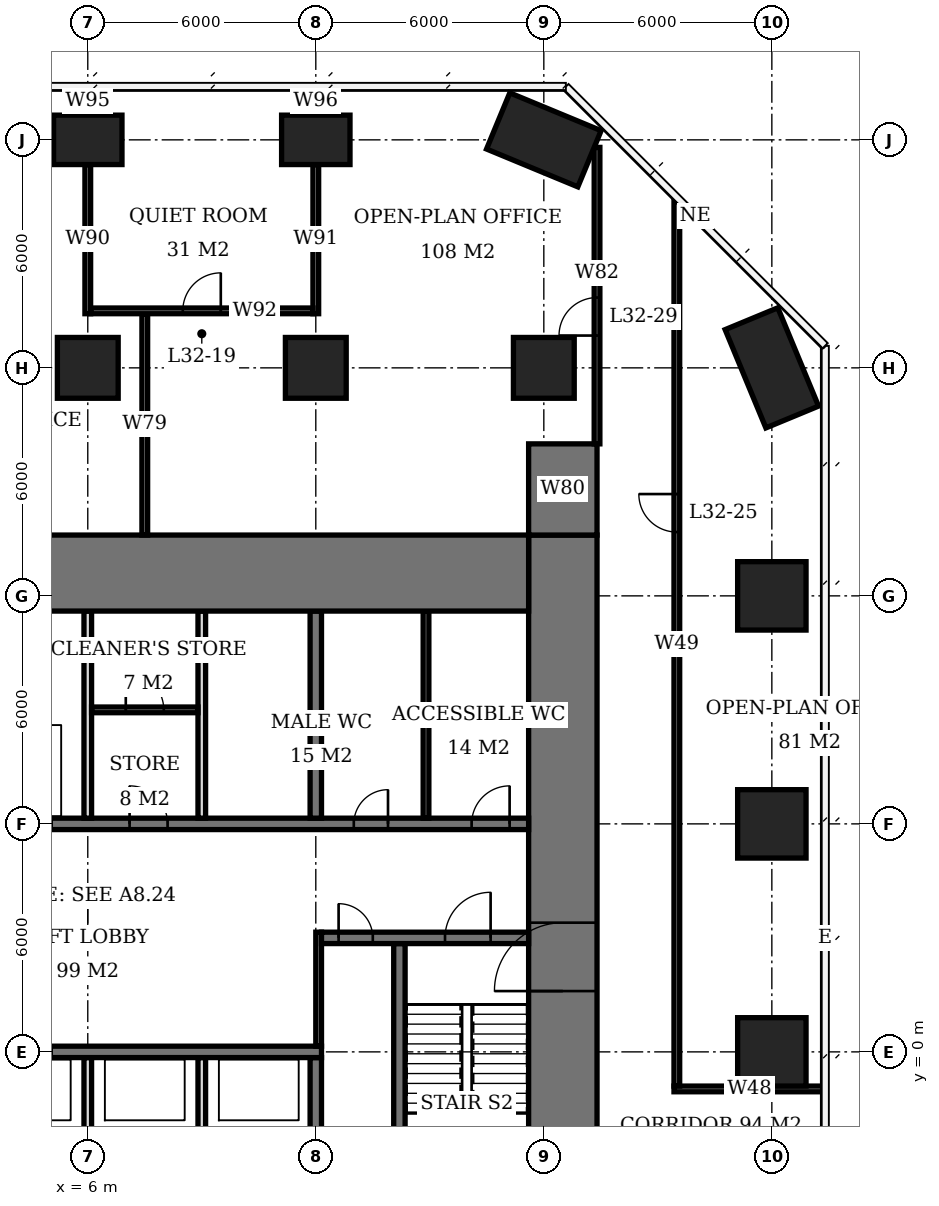
"""IFC4 building model, lengths in metres.
Left out: names, types, materials, properties, quantities, classifications, styles, units other than length and angle.
Written with IfcOpenShell. Run it as: python <this file> out.ifc"""

import sys

from ifc_helpers import new_model, si_unit, direction, frame, frame_2d, origin, origin_2d, place, context, subcontext, project, spatial, rectangle, extrude, element, fill, save


model = new_model("IFC4")
c1 = context("Model", 3, precision=1e-05, world=origin(), true_north=direction((0.0, 1.0)))
c2 = subcontext(c1, "Body", "Model", "MODEL_VIEW")
j1 = project(units=[si_unit("LENGTHUNIT", "METRE"), si_unit("PLANEANGLEUNIT", "RADIAN")], contexts=[c1])
p1 = place(None, origin())
s1 = spatial("IfcSite", under=j1, at=p1, CompositionType="ELEMENT")
p2 = place(p1, origin())
s2 = spatial("IfcBuilding", under=s1, at=p2, CompositionType="ELEMENT")
p3 = place(p2, frame((0.0, 0.0, 132.8)))
s3 = spatial("IfcBuildingStorey", under=s2, at=p3, CompositionType="ELEMENT", Elevation=132.8)
p4 = place(p3, frame((6.0, 18.0, 0.0), z_axis=(0.0, 0.0, 1.0), x_axis=(1.0, 0.0, 0.0)))
e1 = element("IfcColumn", 1, at=p4, inside=s3, PredefinedType="COLUMN", context=c2, shape_type="SweptSolid", body=[
    extrude(rectangle(XDim=1.6, YDim=1.6, at=origin_2d()), origin(), (0.0, 0.0, 1.0), 3.9),
])
p5 = place(p3, frame((6.0, 24.0, 0.0), z_axis=(0.0, 0.0, 1.0), x_axis=(1.0, 0.0, 0.0)))
e2 = element("IfcColumn", 2, at=p5, inside=s3, PredefinedType="COLUMN", context=c2, shape_type="SweptSolid", body=[
    extrude(rectangle(XDim=1.8, YDim=1.3, at=origin_2d()), origin(), (0.0, 0.0, 1.0), 3.9),
])
p6 = place(p3, frame((12.0, 18.0, 0.0), z_axis=(0.0, 0.0, 1.0), x_axis=(1.0, 0.0, 0.0)))
e3 = element("IfcColumn", 3, at=p6, inside=s3, PredefinedType="COLUMN", context=c2, shape_type="SweptSolid", body=[
    extrude(rectangle(XDim=1.6, YDim=1.6, at=origin_2d()), origin(), (0.0, 0.0, 1.0), 3.9),
])
p7 = place(p3, frame((12.0, 24.0, 0.0), z_axis=(0.0, 0.0, 1.0), x_axis=(1.0, 0.0, 0.0)))
e4 = element("IfcColumn", 4, at=p7, inside=s3, PredefinedType="COLUMN", context=c2, shape_type="SweptSolid", body=[
    extrude(rectangle(XDim=1.8, YDim=1.3, at=origin_2d()), origin(), (0.0, 0.0, 1.0), 3.9),
])
p8 = place(p3, frame((18.0, 18.0, 0.0), z_axis=(0.0, 0.0, 1.0), x_axis=(1.0, 0.0, 0.0)))
e5 = element("IfcColumn", 5, at=p8, inside=s3, PredefinedType="COLUMN", context=c2, shape_type="SweptSolid", body=[
    extrude(rectangle(XDim=1.6, YDim=1.6, at=origin_2d()), origin(), (0.0, 0.0, 1.0), 3.9),
])
p9 = place(p3, frame((18.0, 24.0, 0.0), z_axis=(0.0, 0.0, 1.0), x_axis=(0.923879532511, -0.382683432365, 0.0)))
e6 = element("IfcColumn", 6, at=p9, inside=s3, PredefinedType="COLUMN", context=c2, shape_type="SweptSolid", body=[
    extrude(rectangle(XDim=2.6, YDim=1.6, at=origin_2d()), origin(), (0.0, 0.0, 1.0), 3.9),
])
for number, where, z_axis, x_axis in (
    (7, (24.0, 0.0, 0.0), (0.0, 0.0, 1.0), (1.0, 0.0, 0.0)),
    (8, (24.0, 6.0, 0.0), (0.0, 0.0, 1.0), (1.0, 0.0, 0.0)),
    (9, (24.0, 12.0, 0.0), (0.0, 0.0, 1.0), (1.0, 0.0, 0.0)),
):
    element("IfcColumn", number, at=place(p3, frame(where, z_axis=z_axis, x_axis=x_axis)), inside=s3, PredefinedType="COLUMN", context=c2, shape_type="SweptSolid", body=[
        extrude(rectangle(XDim=1.8, YDim=1.8, at=origin_2d()), origin(), (0.0, 0.0, 1.0), 3.9),
    ])
p10 = place(p3, frame((24.0, 18.0, 0.0), z_axis=(0.0, 0.0, 1.0), x_axis=(0.382683432365, -0.923879532511, 0.0)))
e10 = element("IfcColumn", 10, at=p10, inside=s3, PredefinedType="COLUMN", context=c2, shape_type="SweptSolid", body=[
    extrude(rectangle(XDim=2.8, YDim=1.5, at=origin_2d()), origin(), (0.0, 0.0, 1.0), 3.9),
])
p11 = place(p3, frame((-5.6, 12.6, 0.0), z_axis=(0.0, 0.0, 1.0), x_axis=(1.0, 0.0, 0.0)))
e11 = element("IfcWall", 11, at=p11, inside=s3, PredefinedType="SHEAR", context=c2, shape_type="SweptSolid", body=[
    extrude(rectangle(XDim=23.2, YDim=2.0, at=frame_2d((11.6, 0.0))), origin(), (0.0, 0.0, 1.0), 3.9),
])
p12 = place(p3, frame((18.5, -7.6, 0.0), z_axis=(0.0, 0.0, 1.0), x_axis=(0.0, 1.0, 0.0)))
e12 = element("IfcWall", 12, at=p12, inside=s3, PredefinedType="SHEAR", context=c2, shape_type="SweptSolid", body=[
    extrude(rectangle(XDim=21.2, YDim=1.8, at=frame_2d((10.6, 0.0))), origin(), (0.0, 0.0, 1.0), 3.9),
])
p13 = place(p12, frame((9.2, 0.0, 0.0)))
e13 = element("IfcOpeningElement", 13, at=p13, cuts=e12, PredefinedType="OPENING", context=c2, shape_type="SweptSolid", body=[
    extrude(rectangle(XDim=1.8, YDim=2.4, at=frame_2d((0.9, 1.2))), frame((0.0, 0.91, 0.0), z_axis=(0.0, -1.0, 0.0), x_axis=(1.0, 0.0, 0.0)), (0.0, 0.0, 1.0), 1.82),
])
p14 = place(p3, frame((18.5, 13.6, 0.0), z_axis=(0.0, 0.0, 1.0), x_axis=(0.0, 1.0, 0.0)))
e14 = element("IfcWall", 14, at=p14, inside=s3, PredefinedType="SHEAR", context=c2, shape_type="SweptSolid", body=[
    extrude(rectangle(XDim=2.4, YDim=1.8, at=frame_2d((1.2, 0.0))), origin(), (0.0, 0.0, 1.0), 3.9),
])
p15 = place(p3, frame((-5.6, 0.0, 0.0), z_axis=(0.0, 0.0, 1.0), x_axis=(1.0, 0.0, 0.0)))
e15 = element("IfcWall", 15, at=p15, inside=s3, PredefinedType="SHEAR", context=c2, shape_type="SweptSolid", body=[
    extrude(rectangle(XDim=17.75, YDim=0.3, at=frame_2d((8.875, 0.0))), origin(), (0.0, 0.0, 1.0), 3.9),
])
p16 = place(p15, frame((0.6, 0.0, 0.0)))
e16 = element("IfcOpeningElement", 16, at=p16, cuts=e15, PredefinedType="OPENING", context=c2, shape_type="SweptSolid", body=[
    extrude(rectangle(XDim=0.9, YDim=2.1, at=frame_2d((0.45, 1.05))), frame((0.0, 0.16, 0.0), z_axis=(0.0, -1.0, 0.0), x_axis=(1.0, 0.0, 0.0)), (0.0, 0.0, 1.0), 0.32),
])
p17 = place(p15, frame((3.7, 0.0, 0.0)))
e17 = element("IfcOpeningElement", 17, at=p17, cuts=e15, PredefinedType="OPENING", context=c2, shape_type="SweptSolid", body=[
    extrude(rectangle(XDim=1.0, YDim=2.1, at=frame_2d((0.5, 1.05))), frame((0.0, 0.16, 0.0), z_axis=(0.0, -1.0, 0.0), x_axis=(1.0, 0.0, 0.0)), (0.0, 0.0, 1.0), 0.32),
])
p18 = place(p15, frame((6.55, 0.0, 0.0)))
e18 = element("IfcOpeningElement", 18, at=p18, cuts=e15, PredefinedType="OPENING", context=c2, shape_type="SweptSolid", body=[
    extrude(rectangle(XDim=1.1, YDim=2.1, at=frame_2d((0.55, 1.05))), frame((0.0, 0.16, 0.0), z_axis=(0.0, -1.0, 0.0), x_axis=(1.0, 0.0, 0.0)), (0.0, 0.0, 1.0), 0.32),
])
p19 = place(p15, frame((9.55, 0.0, 0.0)))
e19 = element("IfcOpeningElement", 19, at=p19, cuts=e15, PredefinedType="OPENING", context=c2, shape_type="SweptSolid", body=[
    extrude(rectangle(XDim=1.1, YDim=2.1, at=frame_2d((0.55, 1.05))), frame((0.0, 0.16, 0.0), z_axis=(0.0, -1.0, 0.0), x_axis=(1.0, 0.0, 0.0)), (0.0, 0.0, 1.0), 0.32),
])
p20 = place(p3, frame((12.15, 3.0, 0.0), z_axis=(0.0, 0.0, 1.0), x_axis=(1.0, 0.0, 0.0)))
e20 = element("IfcWall", 20, at=p20, inside=s3, PredefinedType="SHEAR", context=c2, shape_type="SweptSolid", body=[
    extrude(rectangle(XDim=5.45, YDim=0.3, at=frame_2d((2.725, 0.0))), origin(), (0.0, 0.0, 1.0), 3.9),
])
p21 = place(p20, frame((3.25, 0.0, 0.0)))
e21 = element("IfcOpeningElement", 21, at=p21, cuts=e20, PredefinedType="OPENING", context=c2, shape_type="SweptSolid", body=[
    extrude(rectangle(XDim=1.2, YDim=2.1, at=frame_2d((0.6, 1.05))), frame((0.0, 0.16, 0.0), z_axis=(0.0, -1.0, 0.0), x_axis=(1.0, 0.0, 0.0)), (0.0, 0.0, 1.0), 0.32),
])
p22 = place(p20, frame((0.45, 0.0, 0.0)))
e22 = element("IfcOpeningElement", 22, at=p22, cuts=e20, PredefinedType="OPENING", context=c2, shape_type="SweptSolid", body=[
    extrude(rectangle(XDim=0.9, YDim=2.1, at=frame_2d((0.45, 1.05))), frame((0.0, 0.16, 0.0), z_axis=(0.0, -1.0, 0.0), x_axis=(1.0, 0.0, 0.0)), (0.0, 0.0, 1.0), 0.32),
])
p23 = place(p3, frame((-0.15, 6.0, 0.0), z_axis=(0.0, 0.0, 1.0), x_axis=(1.0, 0.0, 0.0)))
e23 = element("IfcWall", 23, at=p23, inside=s3, PredefinedType="SHEAR", context=c2, shape_type="SweptSolid", body=[
    extrude(rectangle(XDim=17.75, YDim=0.3, at=frame_2d((8.875, 0.0))), origin(), (0.0, 0.0, 1.0), 3.9),
])
p24 = place(p23, frame((13.15, 0.0, 0.0)))
e24 = element("IfcOpeningElement", 24, at=p24, cuts=e23, PredefinedType="OPENING", context=c2, shape_type="SweptSolid", body=[
    extrude(rectangle(XDim=0.9, YDim=2.1, at=frame_2d((0.45, 1.05))), frame((0.0, 0.16, 0.0), z_axis=(0.0, -1.0, 0.0), x_axis=(1.0, 0.0, 0.0)), (0.0, 0.0, 1.0), 0.32),
])
p25 = place(p23, frame((16.25, 0.0, 0.0)))
e25 = element("IfcOpeningElement", 25, at=p25, cuts=e23, PredefinedType="OPENING", context=c2, shape_type="SweptSolid", body=[
    extrude(rectangle(XDim=1.0, YDim=2.1, at=frame_2d((0.5, 1.05))), frame((0.0, 0.16, 0.0), z_axis=(0.0, -1.0, 0.0), x_axis=(1.0, 0.0, 0.0)), (0.0, 0.0, 1.0), 0.32),
])
p26 = place(p23, frame((7.25, 0.0, 0.0)))
e26 = element("IfcOpeningElement", 26, at=p26, cuts=e23, PredefinedType="OPENING", context=c2, shape_type="SweptSolid", body=[
    extrude(rectangle(XDim=1.0, YDim=2.1, at=frame_2d((0.5, 1.05))), frame((0.0, 0.16, 0.0), z_axis=(0.0, -1.0, 0.0), x_axis=(1.0, 0.0, 0.0)), (0.0, 0.0, 1.0), 0.32),
])
p27 = place(p23, frame((1.1, 0.0, 0.0)))
e27 = element("IfcOpeningElement", 27, at=p27, cuts=e23, PredefinedType="OPENING", context=c2, shape_type="SweptSolid", body=[
    extrude(rectangle(XDim=1.1, YDim=2.1, at=frame_2d((0.55, 1.05))), frame((0.0, 0.16, 0.0), z_axis=(0.0, -1.0, 0.0), x_axis=(1.0, 0.0, 0.0)), (0.0, 0.0, 1.0), 0.32),
])
p28 = place(p23, frame((4.1, 0.0, 0.0)))
e28 = element("IfcOpeningElement", 28, at=p28, cuts=e23, PredefinedType="OPENING", context=c2, shape_type="SweptSolid", body=[
    extrude(rectangle(XDim=1.1, YDim=2.1, at=frame_2d((0.55, 1.05))), frame((0.0, 0.16, 0.0), z_axis=(0.0, -1.0, 0.0), x_axis=(1.0, 0.0, 0.0)), (0.0, 0.0, 1.0), 0.32),
])
for number, where, z_axis, x_axis in (
    (29, (12.0, -5.6, 0.0), (0.0, 0.0, 1.0), (0.0, 1.0, 0.0)),
    (30, (12.0, 6.15, 0.0), (0.0, 0.0, 1.0), (0.0, 1.0, 0.0)),
):
    element("IfcWall", number, at=place(p3, frame(where, z_axis=z_axis, x_axis=x_axis)), inside=s3, PredefinedType="SHEAR", context=c2, shape_type="SweptSolid", body=[
        extrude(rectangle(XDim=5.45, YDim=0.3, at=frame_2d((2.725, 0.0))), origin(), (0.0, 0.0, 1.0), 3.9),
    ])
p29 = place(p3, frame((14.2, -5.6, 0.0), z_axis=(0.0, 0.0, 1.0), x_axis=(0.0, 1.0, 0.0)))
e31 = element("IfcWall", 31, at=p29, inside=s3, PredefinedType="SHEAR", context=c2, shape_type="SweptSolid", body=[
    extrude(rectangle(XDim=8.45, YDim=0.3, at=frame_2d((4.225, 0.0))), origin(), (0.0, 0.0, 1.0), 3.9),
])
for number, where, z_axis, x_axis in (
    (32, (6.0, 6.15, 0.0), (0.0, 0.0, 1.0), (0.0, 1.0, 0.0)),
    (33, (9.0, 6.15, 0.0), (0.0, 0.0, 1.0), (0.0, 1.0, 0.0)),
    (34, (6.0, -5.6, 0.0), (0.0, 0.0, 1.0), (0.0, 1.0, 0.0)),
    (35, (9.0, -5.6, 0.0), (0.0, 0.0, 1.0), (0.0, 1.0, 0.0)),
):
    element("IfcWall", number, at=place(p3, frame(where, z_axis=z_axis, x_axis=x_axis)), inside=s3, PredefinedType="SOLIDWALL", context=c2, shape_type="SweptSolid", body=[
        extrude(rectangle(XDim=5.45, YDim=0.2, at=frame_2d((2.725, 0.0))), origin(), (0.0, 0.0, 1.0), 3.9),
    ])
p30 = place(p3, frame((14.9, 6.15, 0.0), z_axis=(0.0, 0.0, 1.0), x_axis=(0.0, 1.0, 0.0)))
e36 = element("IfcWall", 36, at=p30, inside=s3, PredefinedType="PLUMBINGWALL", context=c2, shape_type="SweptSolid", body=[
    extrude(rectangle(XDim=5.45, YDim=0.15, at=frame_2d((2.725, 0.0))), origin(), (0.0, 0.0, 1.0), 3.65),
])
p31 = place(p3, frame((6.1, 9.0, 0.0), z_axis=(0.0, 0.0, 1.0), x_axis=(1.0, 0.0, 0.0)))
e37 = element("IfcWall", 37, at=p31, inside=s3, PredefinedType="PARTITIONING", context=c2, shape_type="SweptSolid", body=[
    extrude(rectangle(XDim=2.8, YDim=0.15, at=frame_2d((1.4, 0.0))), origin(), (0.0, 0.0, 1.0), 3.65),
])
p32 = place(p31, frame((0.9, 0.0, 0.0)))
e38 = element("IfcOpeningElement", 38, at=p32, cuts=e37, PredefinedType="OPENING", context=c2, shape_type="SweptSolid", body=[
    extrude(rectangle(XDim=1.0, YDim=2.1, at=frame_2d((0.5, 1.05))), frame((0.0, 0.085, 0.0), z_axis=(0.0, -1.0, 0.0), x_axis=(1.0, 0.0, 0.0)), (0.0, 0.0, 1.0), 0.17),
])
p33 = place(p3, frame((6.075, 19.5, 0.0), z_axis=(0.0, 0.0, 1.0), x_axis=(1.0, 0.0, 0.0)))
e39 = element("IfcWall", 39, at=p33, inside=s3, PredefinedType="PARTITIONING", context=c2, shape_type="SweptSolid", body=[
    extrude(rectangle(XDim=5.85, YDim=0.15, at=frame_2d((2.925, 0.0))), origin(), (0.0, 0.0, 1.0), 3.65),
])
p34 = place(p33, frame((2.425, 0.0, 0.0)))
e40 = element("IfcOpeningElement", 40, at=p34, cuts=e39, PredefinedType="OPENING", context=c2, shape_type="SweptSolid", body=[
    extrude(rectangle(XDim=1.0, YDim=2.1, at=frame_2d((0.5, 1.05))), frame((0.0, 0.085, 0.0), z_axis=(0.0, -1.0, 0.0), x_axis=(1.0, 0.0, 0.0)), (0.0, 0.0, 1.0), 0.17),
])
p35 = place(p3, frame((6.0, 19.425, 0.0), z_axis=(0.0, 0.0, 1.0), x_axis=(0.0, 1.0, 0.0)))
e41 = element("IfcWall", 41, at=p35, inside=s3, PredefinedType="PARTITIONING", context=c2, shape_type="SweptSolid", body=[
    extrude(rectangle(XDim=3.925, YDim=0.15, at=frame_2d((1.962, 0.0))), origin(), (0.0, 0.0, 1.0), 3.65),
])
p36 = place(p3, frame((6.0, 24.65, 0.0), z_axis=(0.0, 0.0, 1.0), x_axis=(0.0, 1.0, 0.0)))
e42 = element("IfcWall", 42, at=p36, inside=s3, PredefinedType="PARTITIONING", context=c2, shape_type="SweptSolid", body=[
    extrude(rectangle(XDim=0.75, YDim=0.15, at=frame_2d((0.375, 0.0))), origin(), (0.0, 0.0, 1.0), 3.65),
])
p37 = place(p3, frame((12.0, 19.425, 0.0), z_axis=(0.0, 0.0, 1.0), x_axis=(0.0, 1.0, 0.0)))
e43 = element("IfcWall", 43, at=p37, inside=s3, PredefinedType="PARTITIONING", context=c2, shape_type="SweptSolid", body=[
    extrude(rectangle(XDim=3.925, YDim=0.15, at=frame_2d((1.962, 0.0))), origin(), (0.0, 0.0, 1.0), 3.65),
])
p38 = place(p3, frame((12.0, 24.65, 0.0), z_axis=(0.0, 0.0, 1.0), x_axis=(0.0, 1.0, 0.0)))
e44 = element("IfcWall", 44, at=p38, inside=s3, PredefinedType="PARTITIONING", context=c2, shape_type="SweptSolid", body=[
    extrude(rectangle(XDim=0.75, YDim=0.15, at=frame_2d((0.375, 0.0))), origin(), (0.0, 0.0, 1.0), 3.65),
])
p39 = place(p3, frame((7.5, 13.6, 0.0), z_axis=(0.0, 0.0, 1.0), x_axis=(0.0, 1.0, 0.0)))
e45 = element("IfcWall", 45, at=p39, inside=s3, PredefinedType="PARTITIONING", context=c2, shape_type="SweptSolid", body=[
    extrude(rectangle(XDim=5.825, YDim=0.15, at=frame_2d((2.913, 0.0))), origin(), (0.0, 0.0, 1.0), 3.65),
])
p40 = place(p3, frame((19.4, 16.0, 0.0), z_axis=(0.0, 0.0, 1.0), x_axis=(0.0, 1.0, 0.0)))
e46 = element("IfcWall", 46, at=p40, inside=s3, PredefinedType="PARTITIONING", context=c2, shape_type="SweptSolid", body=[
    extrude(rectangle(XDim=7.802, YDim=0.15, at=frame_2d((3.901, 0.0))), origin(), (0.0, 0.0, 1.0), 3.65),
])
p41 = place(p40, frame((2.85, 0.0, 0.0)))
e47 = element("IfcOpeningElement", 47, at=p41, cuts=e46, PredefinedType="OPENING", context=c2, shape_type="SweptSolid", body=[
    extrude(rectangle(XDim=1.0, YDim=2.1, at=frame_2d((0.5, 1.05))), frame((0.0, 0.085, 0.0), z_axis=(0.0, -1.0, 0.0), x_axis=(1.0, 0.0, 0.0)), (0.0, 0.0, 1.0), 0.17),
])
p42 = place(p3, frame((21.5, -0.9, 0.0), z_axis=(0.0, 0.0, 1.0), x_axis=(0.0, 1.0, 0.0)))
e48 = element("IfcWall", 48, at=p42, inside=s3, PredefinedType="PARTITIONING", context=c2, shape_type="SweptSolid", body=[
    extrude(rectangle(XDim=23.288, YDim=0.15, at=frame_2d((11.644, 0.0))), origin(), (0.0, 0.0, 1.0), 3.65),
])
p43 = place(p42, frame((14.579, 0.0, 0.0)))
e49 = element("IfcOpeningElement", 49, at=p43, cuts=e48, PredefinedType="OPENING", context=c2, shape_type="SweptSolid", body=[
    extrude(rectangle(XDim=1.0, YDim=2.1, at=frame_2d((0.5, 1.05))), frame((0.0, 0.085, 0.0), z_axis=(0.0, -1.0, 0.0), x_axis=(1.0, 0.0, 0.0)), (0.0, 0.0, 1.0), 0.17),
])
p44 = place(p3, frame((21.425, -0.975, 0.0), z_axis=(0.0, 0.0, 1.0), x_axis=(1.0, 0.0, 0.0)))
e50 = element("IfcWall", 50, at=p44, inside=s3, PredefinedType="PARTITIONING", context=c2, shape_type="SweptSolid", body=[
    extrude(rectangle(XDim=3.975, YDim=0.15, at=frame_2d((1.987, 0.0))), origin(), (0.0, 0.0, 1.0), 3.65),
])
p45 = place(p3, frame((12.075, 0.15, 0.0), z_axis=(0.0, 0.0, 1.0), x_axis=(0.0, 1.0, 0.0)))
e51 = element("IfcWall", 51, at=p45, inside=s3, PredefinedType="PARTITIONING", context=c2, shape_type="SweptSolid", body=[
    extrude(rectangle(XDim=3.0, YDim=0.15, at=frame_2d((1.5, 0.0))), origin(), (0.0, 0.0, 1.0), 3.65),
])
p46 = place(p13, origin())
e52 = element("IfcDoor", 52, at=p46, inside=s3, OperationType="DOUBLE_DOOR_SINGLE_SWING", PredefinedType="DOOR", context=c2, shape_type="SweptSolid", body=[
    extrude(rectangle(XDim=1.8, YDim=2.4, at=frame_2d((0.9, 1.2))), frame((0.0, 0.025, 0.0), z_axis=(0.0, -1.0, 0.0), x_axis=(1.0, 0.0, 0.0)), (0.0, 0.0, 1.0), 0.05),
])
fill(e13, e52)
p47 = place(p21, origin())
e53 = element("IfcDoor", 53, at=p47, inside=s3, OperationType="SINGLE_SWING_RIGHT", PredefinedType="DOOR", context=c2, shape_type="SweptSolid", body=[
    extrude(rectangle(XDim=1.2, YDim=2.1, at=frame_2d((0.6, 1.05))), frame((0.0, 0.025, 0.0), z_axis=(0.0, -1.0, 0.0), x_axis=(1.0, 0.0, 0.0)), (0.0, 0.0, 1.0), 0.05),
])
fill(e21, e53)
p48 = place(p22, origin())
e54 = element("IfcDoor", 54, at=p48, inside=s3, OperationType="SINGLE_SWING_LEFT", PredefinedType="DOOR", context=c2, shape_type="SweptSolid", body=[
    extrude(rectangle(XDim=0.9, YDim=2.1, at=frame_2d((0.45, 1.05))), frame((0.0, 0.025, 0.0), z_axis=(0.0, -1.0, 0.0), x_axis=(1.0, 0.0, 0.0)), (0.0, 0.0, 1.0), 0.05),
])
fill(e22, e54)
p49 = place(p24, origin())
e55 = element("IfcDoor", 55, at=p49, inside=s3, OperationType="SINGLE_SWING_RIGHT", PredefinedType="DOOR", context=c2, shape_type="SweptSolid", body=[
    extrude(rectangle(XDim=0.9, YDim=2.1, at=frame_2d((0.45, 1.05))), frame((0.0, 0.025, 0.0), z_axis=(0.0, -1.0, 0.0), x_axis=(1.0, 0.0, 0.0)), (0.0, 0.0, 1.0), 0.05),
])
fill(e24, e55)
p50 = place(p25, origin())
e56 = element("IfcDoor", 56, at=p50, inside=s3, OperationType="SINGLE_SWING_RIGHT", PredefinedType="DOOR", context=c2, shape_type="SweptSolid", body=[
    extrude(rectangle(XDim=1.0, YDim=2.1, at=frame_2d((0.5, 1.05))), frame((0.0, 0.025, 0.0), z_axis=(0.0, -1.0, 0.0), x_axis=(1.0, 0.0, 0.0)), (0.0, 0.0, 1.0), 0.05),
])
fill(e25, e56)
p51 = place(p32, origin())
e57 = element("IfcDoor", 57, at=p51, inside=s3, OperationType="SINGLE_SWING_LEFT", PredefinedType="DOOR", context=c2, shape_type="SweptSolid", body=[
    extrude(rectangle(XDim=1.0, YDim=2.1, at=frame_2d((0.5, 1.05))), frame((0.0, 0.025, 0.0), z_axis=(0.0, -1.0, 0.0), x_axis=(1.0, 0.0, 0.0)), (0.0, 0.0, 1.0), 0.05),
])
fill(e38, e57)
p52 = place(p26, origin())
e58 = element("IfcDoor", 58, at=p52, inside=s3, OperationType="SINGLE_SWING_LEFT", PredefinedType="DOOR", context=c2, shape_type="SweptSolid", body=[
    extrude(rectangle(XDim=1.0, YDim=2.1, at=frame_2d((0.5, 1.05))), frame((0.0, 0.025, 0.0), z_axis=(0.0, -1.0, 0.0), x_axis=(1.0, 0.0, 0.0)), (0.0, 0.0, 1.0), 0.05),
])
fill(e26, e58)
p53 = place(p34, origin())
e59 = element("IfcDoor", 59, at=p53, inside=s3, OperationType="SINGLE_SWING_RIGHT", PredefinedType="DOOR", context=c2, shape_type="SweptSolid", body=[
    extrude(rectangle(XDim=1.0, YDim=2.1, at=frame_2d((0.5, 1.05))), frame((0.0, 0.025, 0.0), z_axis=(0.0, -1.0, 0.0), x_axis=(1.0, 0.0, 0.0)), (0.0, 0.0, 1.0), 0.05),
])
fill(e40, e59)
p54 = place(p43, origin())
e60 = element("IfcDoor", 60, at=p54, inside=s3, OperationType="SINGLE_SWING_RIGHT", PredefinedType="DOOR", context=c2, shape_type="SweptSolid", body=[
    extrude(rectangle(XDim=1.0, YDim=2.1, at=frame_2d((0.5, 1.05))), frame((0.0, 0.025, 0.0), z_axis=(0.0, -1.0, 0.0), x_axis=(1.0, 0.0, 0.0)), (0.0, 0.0, 1.0), 0.05),
])
fill(e49, e60)
p55 = place(p41, origin())
e61 = element("IfcDoor", 61, at=p55, inside=s3, OperationType="SINGLE_SWING_LEFT", PredefinedType="DOOR", context=c2, shape_type="SweptSolid", body=[
    extrude(rectangle(XDim=1.0, YDim=2.1, at=frame_2d((0.5, 1.05))), frame((0.0, 0.025, 0.0), z_axis=(0.0, -1.0, 0.0), x_axis=(1.0, 0.0, 0.0)), (0.0, 0.0, 1.0), 0.05),
])
fill(e47, e61)
save(model, sys.argv[1])
